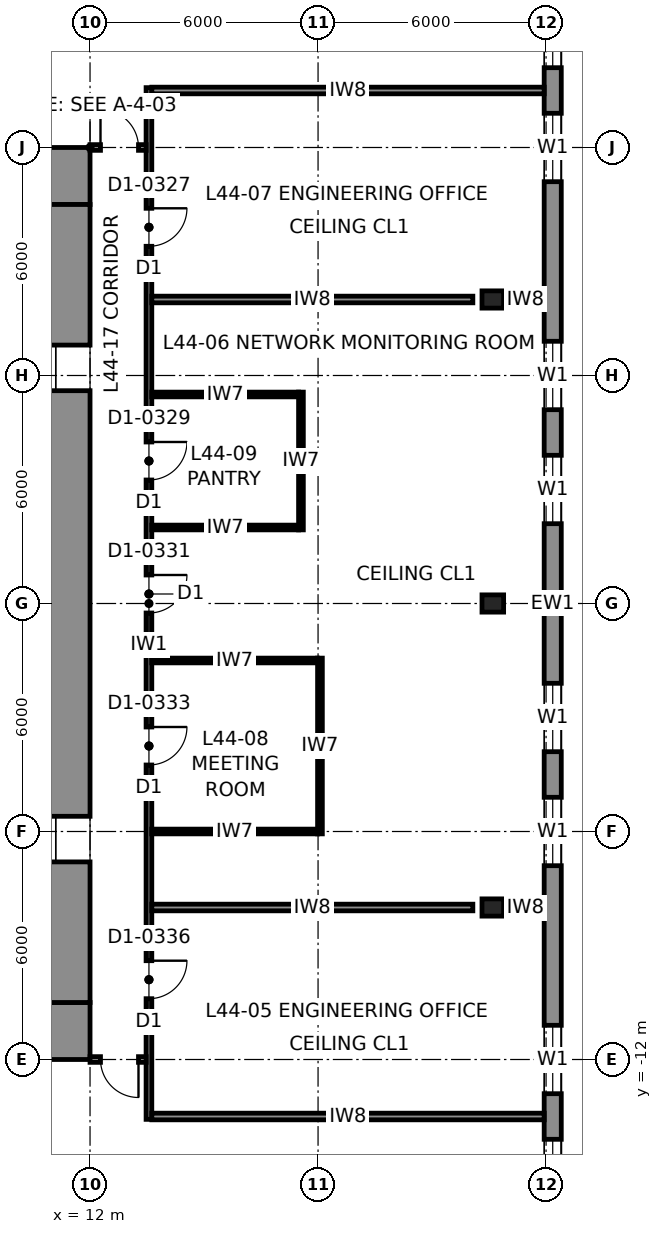
"""IFC4 building model, lengths in metres.
Left out: names, types, materials, properties, quantities, classifications, styles, units other than length and angle.
Written with IfcOpenShell. Run it as: python <this file> out.ifc"""

import sys

from ifc_helpers import new_model, si_unit, direction, frame, frame_2d, origin, origin_2d, place, context, subcontext, project, spatial, rectangle, i_section, extrude, element, fill, save


model = new_model("IFC4")
c1 = context("Model", 3, precision=1e-05, world=origin(), true_north=direction((0.0, 1.0)))
c2 = subcontext(c1, "Body", "Model", "MODEL_VIEW")
j1 = project(units=[si_unit("LENGTHUNIT", "METRE"), si_unit("PLANEANGLEUNIT", "RADIAN")], contexts=[c1])
p1 = place(None, origin())
s1 = spatial("IfcSite", under=j1, at=p1, CompositionType="ELEMENT")
p2 = place(p1, origin())
s2 = spatial("IfcBuilding", under=s1, at=p2, CompositionType="ELEMENT")
p3 = place(p2, frame((0.0, 0.0, 205.8)))
s3 = spatial("IfcBuildingStorey", under=s2, at=p3, CompositionType="ELEMENT", Elevation=205.8)
for number, where, z_axis, x_axis in (
    (1, (22.598, 0.0, 0.0), (-0.04, 0.0, 0.999), (0.0, -1.0, 0.0)),
    (2, (22.598, -8.0, 0.0), (-0.04, 0.0, 0.999), (0.0, -1.0, 0.0)),
    (3, (22.598, 8.0, 0.0), (-0.04, 0.0, 0.999), (0.0, -1.0, 0.0)),
):
    element("IfcColumn", number, at=place(p3, frame(where, z_axis=z_axis, x_axis=x_axis)), inside=s3, PredefinedType="COLUMN", context=c2, shape_type="SweptSolid", body=[
        extrude(i_section(OverallWidth=0.454, OverallDepth=0.569, WebThickness=0.078, FlangeThickness=0.125, at=origin_2d()), origin(), (0.0, 0.0, 1.0), 4.003),
    ])
for number, where, z_axis, x_axis in (
    (4, (-12.0, 11.25, 0.0), (0.0, 0.0, 1.0), (1.0, 0.0, 0.0)),
    (5, (12.0, -11.25, 0.0), (0.0, 0.0, 1.0), (-1.0, 0.0, 0.0)),
):
    element("IfcWall", number, at=place(p3, frame(where, z_axis=z_axis, x_axis=x_axis)), inside=s3, PredefinedType="SHEAR", context=c2, shape_type="SweptSolid", body=[
        extrude(rectangle(XDim=24.0, YDim=1.5, at=frame_2d((12.0, 0.0))), origin(), (0.0, 0.0, 1.0), 4.0),
    ])
p4 = place(p3, frame((11.25, 10.5, 0.0), z_axis=(0.0, 0.0, 1.0), x_axis=(0.0, -1.0, 0.0)))
e6 = element("IfcWall", 6, at=p4, inside=s3, PredefinedType="SHEAR", context=c2, shape_type="SweptSolid", body=[
    extrude(rectangle(XDim=21.0, YDim=1.5, at=frame_2d((10.5, 0.0))), origin(), (0.0, 0.0, 1.0), 4.0),
])
p5 = place(p4, frame((3.7, 0.0, 0.0)))
e7 = element("IfcOpeningElement", 7, at=p5, cuts=e6, PredefinedType="OPENING", context=c2, shape_type="SweptSolid", body=[
    extrude(rectangle(XDim=1.2, YDim=2.3, at=frame_2d((0.6, 1.15))), frame((0.0, 0.76, 0.0), z_axis=(0.0, -1.0, 0.0), x_axis=(1.0, 0.0, 0.0)), (0.0, 0.0, 1.0), 1.52),
])
p6 = place(p4, frame((16.1, 0.0, 0.0)))
e8 = element("IfcOpeningElement", 8, at=p6, cuts=e6, PredefinedType="OPENING", context=c2, shape_type="SweptSolid", body=[
    extrude(rectangle(XDim=1.2, YDim=2.3, at=frame_2d((0.6, 1.15))), frame((0.0, 0.76, 0.0), z_axis=(0.0, -1.0, 0.0), x_axis=(1.0, 0.0, 0.0)), (0.0, 0.0, 1.0), 1.52),
])
p7 = place(p3, frame((24.175, -19.9, 0.0), z_axis=(0.0, 0.0, 1.0), x_axis=(0.0, 1.0, 0.0)))
e9 = element("IfcWall", 9, at=p7, inside=s3, PredefinedType="SOLIDWALL", context=c2, shape_type="SweptSolid", body=[
    extrude(rectangle(XDim=39.8, YDim=0.45, at=frame_2d((19.9, 0.0))), origin(), (0.0, 0.0, 1.0), 3.83),
])
p8 = place(p7, frame((4.0, 0.0, 0.7)))
e10 = element("IfcOpeningElement", 10, at=p8, cuts=e9, PredefinedType="OPENING", context=c2, shape_type="SweptSolid", body=[
    extrude(rectangle(XDim=1.8, YDim=2.6, at=frame_2d((0.9, 1.3))), frame((0.0, 0.235, 0.0), z_axis=(0.0, -1.0, 0.0), x_axis=(1.0, 0.0, 0.0)), (0.0, 0.0, 1.0), 0.47),
])
p9 = place(p7, frame((7.0, 0.0, 0.7)))
e11 = element("IfcOpeningElement", 11, at=p9, cuts=e9, PredefinedType="OPENING", context=c2, shape_type="SweptSolid", body=[
    extrude(rectangle(XDim=1.8, YDim=2.6, at=frame_2d((0.9, 1.3))), frame((0.0, 0.235, 0.0), z_axis=(0.0, -1.0, 0.0), x_axis=(1.0, 0.0, 0.0)), (0.0, 0.0, 1.0), 0.47),
])
p10 = place(p7, frame((13.0, 0.0, 0.7)))
e12 = element("IfcOpeningElement", 12, at=p10, cuts=e9, PredefinedType="OPENING", context=c2, shape_type="SweptSolid", body=[
    extrude(rectangle(XDim=1.8, YDim=2.6, at=frame_2d((0.9, 1.3))), frame((0.0, 0.235, 0.0), z_axis=(0.0, -1.0, 0.0), x_axis=(1.0, 0.0, 0.0)), (0.0, 0.0, 1.0), 0.47),
])
p11 = place(p7, frame((16.0, 0.0, 0.7)))
e13 = element("IfcOpeningElement", 13, at=p11, cuts=e9, PredefinedType="OPENING", context=c2, shape_type="SweptSolid", body=[
    extrude(rectangle(XDim=1.8, YDim=2.6, at=frame_2d((0.9, 1.3))), frame((0.0, 0.235, 0.0), z_axis=(0.0, -1.0, 0.0), x_axis=(1.0, 0.0, 0.0)), (0.0, 0.0, 1.0), 0.47),
])
p12 = place(p7, frame((22.0, 0.0, 0.7)))
e14 = element("IfcOpeningElement", 14, at=p12, cuts=e9, PredefinedType="OPENING", context=c2, shape_type="SweptSolid", body=[
    extrude(rectangle(XDim=1.8, YDim=2.6, at=frame_2d((0.9, 1.3))), frame((0.0, 0.235, 0.0), z_axis=(0.0, -1.0, 0.0), x_axis=(1.0, 0.0, 0.0)), (0.0, 0.0, 1.0), 0.47),
])
p13 = place(p7, frame((25.0, 0.0, 0.7)))
e15 = element("IfcOpeningElement", 15, at=p13, cuts=e9, PredefinedType="OPENING", context=c2, shape_type="SweptSolid", body=[
    extrude(rectangle(XDim=1.8, YDim=2.6, at=frame_2d((0.9, 1.3))), frame((0.0, 0.235, 0.0), z_axis=(0.0, -1.0, 0.0), x_axis=(1.0, 0.0, 0.0)), (0.0, 0.0, 1.0), 0.47),
])
p14 = place(p7, frame((31.0, 0.0, 0.7)))
e16 = element("IfcOpeningElement", 16, at=p14, cuts=e9, PredefinedType="OPENING", context=c2, shape_type="SweptSolid", body=[
    extrude(rectangle(XDim=1.8, YDim=2.6, at=frame_2d((0.9, 1.3))), frame((0.0, 0.235, 0.0), z_axis=(0.0, -1.0, 0.0), x_axis=(1.0, 0.0, 0.0)), (0.0, 0.0, 1.0), 0.47),
])
p15 = place(p7, frame((34.0, 0.0, 0.7)))
e17 = element("IfcOpeningElement", 17, at=p15, cuts=e9, PredefinedType="OPENING", context=c2, shape_type="SweptSolid", body=[
    extrude(rectangle(XDim=1.8, YDim=2.6, at=frame_2d((0.9, 1.3))), frame((0.0, 0.235, 0.0), z_axis=(0.0, -1.0, 0.0), x_axis=(1.0, 0.0, 0.0)), (0.0, 0.0, 1.0), 0.47),
])
p16 = place(p3, frame((13.55, -13.575, 0.0), z_axis=(0.0, 0.0, 1.0), x_axis=(0.0, 1.0, 0.0)))
e18 = element("IfcWall", 18, at=p16, inside=s3, PredefinedType="PARTITIONING", context=c2, shape_type="SweptSolid", body=[
    extrude(rectangle(XDim=27.15, YDim=0.15, at=frame_2d((13.575, 0.0))), origin(), (0.0, 0.0, 1.0), 3.83),
])
p17 = place(p16, frame((3.175, 0.0, 0.0)))
e19 = element("IfcOpeningElement", 19, at=p17, cuts=e18, PredefinedType="OPENING", context=c2, shape_type="SweptSolid", body=[
    extrude(rectangle(XDim=1.0, YDim=2.3, at=frame_2d((0.5, 1.15))), frame((0.0, 0.085, 0.0), z_axis=(0.0, -1.0, 0.0), x_axis=(1.0, 0.0, 0.0)), (0.0, 0.0, 1.0), 0.17),
])
p18 = place(p16, frame((13.325, 0.0, 0.0)))
e20 = element("IfcOpeningElement", 20, at=p18, cuts=e18, PredefinedType="OPENING", context=c2, shape_type="SweptSolid", body=[
    extrude(rectangle(XDim=1.0, YDim=2.3, at=frame_2d((0.5, 1.15))), frame((0.0, 0.085, 0.0), z_axis=(0.0, -1.0, 0.0), x_axis=(1.0, 0.0, 0.0)), (0.0, 0.0, 1.0), 0.17),
])
p19 = place(p16, frame((22.975, 0.0, 0.0)))
e21 = element("IfcOpeningElement", 21, at=p19, cuts=e18, PredefinedType="OPENING", context=c2, shape_type="SweptSolid", body=[
    extrude(rectangle(XDim=1.0, YDim=2.3, at=frame_2d((0.5, 1.15))), frame((0.0, 0.085, 0.0), z_axis=(0.0, -1.0, 0.0), x_axis=(1.0, 0.0, 0.0)), (0.0, 0.0, 1.0), 0.17),
])
p20 = place(p16, frame((9.325, 0.0, 0.0)))
e22 = element("IfcOpeningElement", 22, at=p20, cuts=e18, PredefinedType="OPENING", context=c2, shape_type="SweptSolid", body=[
    extrude(rectangle(XDim=1.0, YDim=2.3, at=frame_2d((0.5, 1.15))), frame((0.0, 0.085, 0.0), z_axis=(0.0, -1.0, 0.0), x_axis=(1.0, 0.0, 0.0)), (0.0, 0.0, 1.0), 0.17),
])
p21 = place(p16, frame((16.825, 0.0, 0.0)))
e23 = element("IfcOpeningElement", 23, at=p21, cuts=e18, PredefinedType="OPENING", context=c2, shape_type="SweptSolid", body=[
    extrude(rectangle(XDim=1.0, YDim=2.3, at=frame_2d((0.5, 1.15))), frame((0.0, 0.085, 0.0), z_axis=(0.0, -1.0, 0.0), x_axis=(1.0, 0.0, 0.0)), (0.0, 0.0, 1.0), 0.17),
])
p22 = place(p3, frame((12.0, 12.0, 0.0), z_axis=(0.0, 0.0, 1.0), x_axis=(1.0, 0.0, 0.0)))
e24 = element("IfcWall", 24, at=p22, inside=s3, PredefinedType="PARTITIONING", context=c2, shape_type="SweptSolid", body=[
    extrude(rectangle(XDim=1.475, YDim=0.15, at=frame_2d((0.738, 0.0))), origin(), (0.0, 0.0, 1.0), 3.83),
])
p23 = place(p22, frame((0.275, 0.0, 0.0)))
e25 = element("IfcOpeningElement", 25, at=p23, cuts=e24, PredefinedType="OPENING", context=c2, shape_type="SweptSolid", body=[
    extrude(rectangle(XDim=1.0, YDim=2.3, at=frame_2d((0.5, 1.15))), frame((0.0, 0.085, 0.0), z_axis=(0.0, -1.0, 0.0), x_axis=(1.0, 0.0, 0.0)), (0.0, 0.0, 1.0), 0.17),
])
p24 = place(p3, frame((13.475, -12.0, 0.0), z_axis=(0.0, 0.0, 1.0), x_axis=(-1.0, 0.0, 0.0)))
e26 = element("IfcWall", 26, at=p24, inside=s3, PredefinedType="PARTITIONING", context=c2, shape_type="SweptSolid", body=[
    extrude(rectangle(XDim=1.475, YDim=0.15, at=frame_2d((0.738, 0.0))), origin(), (0.0, 0.0, 1.0), 3.83),
])
p25 = place(p24, frame((0.2, 0.0, 0.0)))
e27 = element("IfcOpeningElement", 27, at=p25, cuts=e26, PredefinedType="OPENING", context=c2, shape_type="SweptSolid", body=[
    extrude(rectangle(XDim=1.0, YDim=2.3, at=frame_2d((0.5, 1.15))), frame((0.0, 0.085, 0.0), z_axis=(0.0, -1.0, 0.0), x_axis=(1.0, 0.0, 0.0)), (0.0, 0.0, 1.0), 0.17),
])
for number, where, z_axis, x_axis in (
    (28, (13.625, 13.5, 0.0), (0.0, 0.0, 1.0), (1.0, 0.0, 0.0)),
    (29, (23.95, -13.5, 0.0), (0.0, 0.0, 1.0), (-1.0, 0.0, 0.0)),
):
    element("IfcWall", number, at=place(p3, frame(where, z_axis=z_axis, x_axis=x_axis)), inside=s3, PredefinedType="PARTITIONING", context=c2, shape_type="SweptSolid", body=[
        extrude(rectangle(XDim=10.325, YDim=0.175, at=frame_2d((5.163, 0.0))), origin(), (0.0, 0.0, 1.0), 3.83),
    ])
p26 = place(p3, frame((13.625, -8.0, 0.0), z_axis=(0.0, 0.0, 1.0), x_axis=(1.0, 0.0, 0.0)))
e30 = element("IfcWall", 30, at=p26, inside=s3, PredefinedType="PARTITIONING", context=c2, shape_type="SweptSolid", body=[
    extrude(rectangle(XDim=8.448, YDim=0.175, at=frame_2d((4.224, 0.0))), origin(), (0.0, 0.0, 1.0), 3.04),
])
p27 = place(p3, frame((22.962, -8.0, 0.0), z_axis=(0.0, 0.0, 1.0), x_axis=(1.0, 0.0, 0.0)))
e31 = element("IfcWall", 31, at=p27, inside=s3, PredefinedType="PARTITIONING", context=c2, shape_type="SweptSolid", body=[
    extrude(rectangle(XDim=0.988, YDim=0.175, at=frame_2d((0.494, 0.0))), origin(), (0.0, 0.0, 1.0), 3.83),
])
p28 = place(p3, frame((13.625, 8.0, 0.0), z_axis=(0.0, 0.0, 1.0), x_axis=(1.0, 0.0, 0.0)))
e32 = element("IfcWall", 32, at=p28, inside=s3, PredefinedType="PARTITIONING", context=c2, shape_type="SweptSolid", body=[
    extrude(rectangle(XDim=8.448, YDim=0.175, at=frame_2d((4.224, 0.0))), origin(), (0.0, 0.0, 1.0), 3.04),
])
p29 = place(p3, frame((22.962, 8.0, 0.0), z_axis=(0.0, 0.0, 1.0), x_axis=(1.0, 0.0, 0.0)))
e33 = element("IfcWall", 33, at=p29, inside=s3, PredefinedType="PARTITIONING", context=c2, shape_type="SweptSolid", body=[
    extrude(rectangle(XDim=0.988, YDim=0.175, at=frame_2d((0.494, 0.0))), origin(), (0.0, 0.0, 1.0), 3.83),
])
p30 = place(p3, frame((18.05, -6.062, 0.0), z_axis=(0.0, 0.0, 1.0), x_axis=(0.0, 1.0, 0.0)))
e34 = element("IfcWall", 34, at=p30, inside=s3, PredefinedType="PARTITIONING", context=c2, shape_type="SweptSolid", body=[
    extrude(rectangle(XDim=4.625, YDim=0.125, at=frame_2d((2.312, 0.0))), origin(), (0.0, 0.0, 1.0), 3.83),
])
for number, where, z_axis, x_axis in (
    (35, (13.625, -6.0, 0.0), (0.0, 0.0, 1.0), (1.0, 0.0, 0.0)),
    (36, (13.625, -1.5, 0.0), (0.0, 0.0, 1.0), (1.0, 0.0, 0.0)),
):
    element("IfcWall", number, at=place(p3, frame(where, z_axis=z_axis, x_axis=x_axis)), inside=s3, PredefinedType="PARTITIONING", context=c2, shape_type="SweptSolid", body=[
        extrude(rectangle(XDim=4.363, YDim=0.125, at=frame_2d((2.181, 0.0))), origin(), (0.0, 0.0, 1.0), 3.83),
    ])
p31 = place(p3, frame((17.55, 1.938, 0.0), z_axis=(0.0, 0.0, 1.0), x_axis=(0.0, 1.0, 0.0)))
e37 = element("IfcWall", 37, at=p31, inside=s3, PredefinedType="PARTITIONING", context=c2, shape_type="SweptSolid", body=[
    extrude(rectangle(XDim=3.625, YDim=0.125, at=frame_2d((1.812, 0.0))), origin(), (0.0, 0.0, 1.0), 3.83),
])
for number, where, z_axis, x_axis in (
    (38, (13.625, 2.0, 0.0), (0.0, 0.0, 1.0), (1.0, 0.0, 0.0)),
    (39, (13.625, 5.5, 0.0), (0.0, 0.0, 1.0), (1.0, 0.0, 0.0)),
):
    element("IfcWall", number, at=place(p3, frame(where, z_axis=z_axis, x_axis=x_axis)), inside=s3, PredefinedType="PARTITIONING", context=c2, shape_type="SweptSolid", body=[
        extrude(rectangle(XDim=3.863, YDim=0.125, at=frame_2d((1.931, 0.0))), origin(), (0.0, 0.0, 1.0), 3.83),
    ])
p32 = place(p8, origin())
e40 = element("IfcWindow", 40, at=p32, inside=s3, PartitioningType="SINGLE_PANEL", PredefinedType="WINDOW", context=c2, shape_type="SweptSolid", body=[
    extrude(rectangle(XDim=1.8, YDim=2.6, at=frame_2d((0.9, 1.3))), frame((0.0, 0.03, 0.0), z_axis=(0.0, -1.0, 0.0), x_axis=(1.0, 0.0, 0.0)), (0.0, 0.0, 1.0), 0.06),
])
fill(e10, e40)
p33 = place(p9, origin())
e41 = element("IfcWindow", 41, at=p33, inside=s3, PartitioningType="SINGLE_PANEL", PredefinedType="WINDOW", context=c2, shape_type="SweptSolid", body=[
    extrude(rectangle(XDim=1.8, YDim=2.6, at=frame_2d((0.9, 1.3))), frame((0.0, 0.03, 0.0), z_axis=(0.0, -1.0, 0.0), x_axis=(1.0, 0.0, 0.0)), (0.0, 0.0, 1.0), 0.06),
])
fill(e11, e41)
p34 = place(p10, origin())
e42 = element("IfcWindow", 42, at=p34, inside=s3, PartitioningType="SINGLE_PANEL", PredefinedType="WINDOW", context=c2, shape_type="SweptSolid", body=[
    extrude(rectangle(XDim=1.8, YDim=2.6, at=frame_2d((0.9, 1.3))), frame((0.0, 0.03, 0.0), z_axis=(0.0, -1.0, 0.0), x_axis=(1.0, 0.0, 0.0)), (0.0, 0.0, 1.0), 0.06),
])
fill(e12, e42)
p35 = place(p11, origin())
e43 = element("IfcWindow", 43, at=p35, inside=s3, PartitioningType="SINGLE_PANEL", PredefinedType="WINDOW", context=c2, shape_type="SweptSolid", body=[
    extrude(rectangle(XDim=1.8, YDim=2.6, at=frame_2d((0.9, 1.3))), frame((0.0, 0.03, 0.0), z_axis=(0.0, -1.0, 0.0), x_axis=(1.0, 0.0, 0.0)), (0.0, 0.0, 1.0), 0.06),
])
fill(e13, e43)
p36 = place(p12, origin())
e44 = element("IfcWindow", 44, at=p36, inside=s3, PartitioningType="SINGLE_PANEL", PredefinedType="WINDOW", context=c2, shape_type="SweptSolid", body=[
    extrude(rectangle(XDim=1.8, YDim=2.6, at=frame_2d((0.9, 1.3))), frame((0.0, 0.03, 0.0), z_axis=(0.0, -1.0, 0.0), x_axis=(1.0, 0.0, 0.0)), (0.0, 0.0, 1.0), 0.06),
])
fill(e14, e44)
p37 = place(p13, origin())
e45 = element("IfcWindow", 45, at=p37, inside=s3, PartitioningType="SINGLE_PANEL", PredefinedType="WINDOW", context=c2, shape_type="SweptSolid", body=[
    extrude(rectangle(XDim=1.8, YDim=2.6, at=frame_2d((0.9, 1.3))), frame((0.0, 0.03, 0.0), z_axis=(0.0, -1.0, 0.0), x_axis=(1.0, 0.0, 0.0)), (0.0, 0.0, 1.0), 0.06),
])
fill(e15, e45)
p38 = place(p14, origin())
e46 = element("IfcWindow", 46, at=p38, inside=s3, PartitioningType="SINGLE_PANEL", PredefinedType="WINDOW", context=c2, shape_type="SweptSolid", body=[
    extrude(rectangle(XDim=1.8, YDim=2.6, at=frame_2d((0.9, 1.3))), frame((0.0, 0.03, 0.0), z_axis=(0.0, -1.0, 0.0), x_axis=(1.0, 0.0, 0.0)), (0.0, 0.0, 1.0), 0.06),
])
fill(e16, e46)
p39 = place(p15, origin())
e47 = element("IfcWindow", 47, at=p39, inside=s3, PartitioningType="SINGLE_PANEL", PredefinedType="WINDOW", context=c2, shape_type="SweptSolid", body=[
    extrude(rectangle(XDim=1.8, YDim=2.6, at=frame_2d((0.9, 1.3))), frame((0.0, 0.03, 0.0), z_axis=(0.0, -1.0, 0.0), x_axis=(1.0, 0.0, 0.0)), (0.0, 0.0, 1.0), 0.06),
])
fill(e17, e47)
p40 = place(p23, origin())
e48 = element("IfcDoor", 48, at=p40, inside=s3, OperationType="SINGLE_SWING_LEFT", PredefinedType="DOOR", context=c2, shape_type="SweptSolid", body=[
    extrude(rectangle(XDim=1.0, YDim=2.3, at=frame_2d((0.5, 1.15))), frame((0.0, 0.025, 0.0), z_axis=(0.0, -1.0, 0.0), x_axis=(1.0, 0.0, 0.0)), (0.0, 0.0, 1.0), 0.05),
])
fill(e25, e48)
p41 = place(p25, origin())
e49 = element("IfcDoor", 49, at=p41, inside=s3, OperationType="SINGLE_SWING_LEFT", PredefinedType="DOOR", context=c2, shape_type="SweptSolid", body=[
    extrude(rectangle(XDim=1.0, YDim=2.3, at=frame_2d((0.5, 1.15))), frame((0.0, 0.025, 0.0), z_axis=(0.0, -1.0, 0.0), x_axis=(1.0, 0.0, 0.0)), (0.0, 0.0, 1.0), 0.05),
])
fill(e27, e49)
p42 = place(p17, frame((1.0, 0.0, 0.0), z_axis=(0.0, 0.0, 1.0), x_axis=(-1.0, 0.0, 0.0)))
e50 = element("IfcDoor", 50, at=p42, inside=s3, OperationType="SINGLE_SWING_LEFT", PredefinedType="DOOR", context=c2, shape_type="SweptSolid", body=[
    extrude(rectangle(XDim=1.0, YDim=2.3, at=frame_2d((0.5, 1.15))), frame((0.0, 0.025, 0.0), z_axis=(0.0, -1.0, 0.0), x_axis=(1.0, 0.0, 0.0)), (0.0, 0.0, 1.0), 0.05),
])
fill(e19, e50)
p43 = place(p18, frame((1.0, 0.0, 0.0), z_axis=(0.0, 0.0, 1.0), x_axis=(-1.0, 0.0, 0.0)))
e51 = element("IfcDoor", 51, at=p43, inside=s3, OperationType="SINGLE_SWING_LEFT", PredefinedType="DOOR", context=c2, shape_type="SweptSolid", body=[
    extrude(rectangle(XDim=1.0, YDim=2.3, at=frame_2d((0.5, 1.15))), frame((0.0, 0.025, 0.0), z_axis=(0.0, -1.0, 0.0), x_axis=(1.0, 0.0, 0.0)), (0.0, 0.0, 1.0), 0.05),
])
fill(e20, e51)
p44 = place(p19, frame((1.0, 0.0, 0.0), z_axis=(0.0, 0.0, 1.0), x_axis=(-1.0, 0.0, 0.0)))
e52 = element("IfcDoor", 52, at=p44, inside=s3, OperationType="SINGLE_SWING_LEFT", PredefinedType="DOOR", context=c2, shape_type="SweptSolid", body=[
    extrude(rectangle(XDim=1.0, YDim=2.3, at=frame_2d((0.5, 1.15))), frame((0.0, 0.025, 0.0), z_axis=(0.0, -1.0, 0.0), x_axis=(1.0, 0.0, 0.0)), (0.0, 0.0, 1.0), 0.05),
])
fill(e21, e52)
p45 = place(p20, frame((1.0, 0.0, 0.0), z_axis=(0.0, 0.0, 1.0), x_axis=(-1.0, 0.0, 0.0)))
e53 = element("IfcDoor", 53, at=p45, inside=s3, OperationType="SINGLE_SWING_LEFT", PredefinedType="DOOR", context=c2, shape_type="SweptSolid", body=[
    extrude(rectangle(XDim=1.0, YDim=2.3, at=frame_2d((0.5, 1.15))), frame((0.0, 0.025, 0.0), z_axis=(0.0, -1.0, 0.0), x_axis=(1.0, 0.0, 0.0)), (0.0, 0.0, 1.0), 0.05),
])
fill(e22, e53)
p46 = place(p21, frame((1.0, 0.0, 0.0), z_axis=(0.0, 0.0, 1.0), x_axis=(-1.0, 0.0, 0.0)))
e54 = element("IfcDoor", 54, at=p46, inside=s3, OperationType="SINGLE_SWING_LEFT", PredefinedType="DOOR", context=c2, shape_type="SweptSolid", body=[
    extrude(rectangle(XDim=1.0, YDim=2.3, at=frame_2d((0.5, 1.15))), frame((0.0, 0.025, 0.0), z_axis=(0.0, -1.0, 0.0), x_axis=(1.0, 0.0, 0.0)), (0.0, 0.0, 1.0), 0.05),
])
fill(e23, e54)
p47 = place(p5, frame((1.2, 0.0, 0.0), z_axis=(0.0, 0.0, 1.0), x_axis=(-1.0, 0.0, 0.0)))
e55 = element("IfcDoor", 55, at=p47, inside=s3, OperationType="SINGLE_SWING_LEFT", PredefinedType="DOOR", context=c2, shape_type="SweptSolid", body=[
    extrude(rectangle(XDim=1.2, YDim=2.3, at=frame_2d((0.6, 1.15))), frame((0.0, 0.025, 0.0), z_axis=(0.0, -1.0, 0.0), x_axis=(1.0, 0.0, 0.0)), (0.0, 0.0, 1.0), 0.05),
])
fill(e7, e55)
p48 = place(p6, frame((1.2, 0.0, 0.0), z_axis=(0.0, 0.0, 1.0), x_axis=(-1.0, 0.0, 0.0)))
e56 = element("IfcDoor", 56, at=p48, inside=s3, OperationType="SINGLE_SWING_LEFT", PredefinedType="DOOR", context=c2, shape_type="SweptSolid", body=[
    extrude(rectangle(XDim=1.2, YDim=2.3, at=frame_2d((0.6, 1.15))), frame((0.0, 0.025, 0.0), z_axis=(0.0, -1.0, 0.0), x_axis=(1.0, 0.0, 0.0)), (0.0, 0.0, 1.0), 0.05),
])
fill(e8, e56)
save(model, sys.argv[1])
